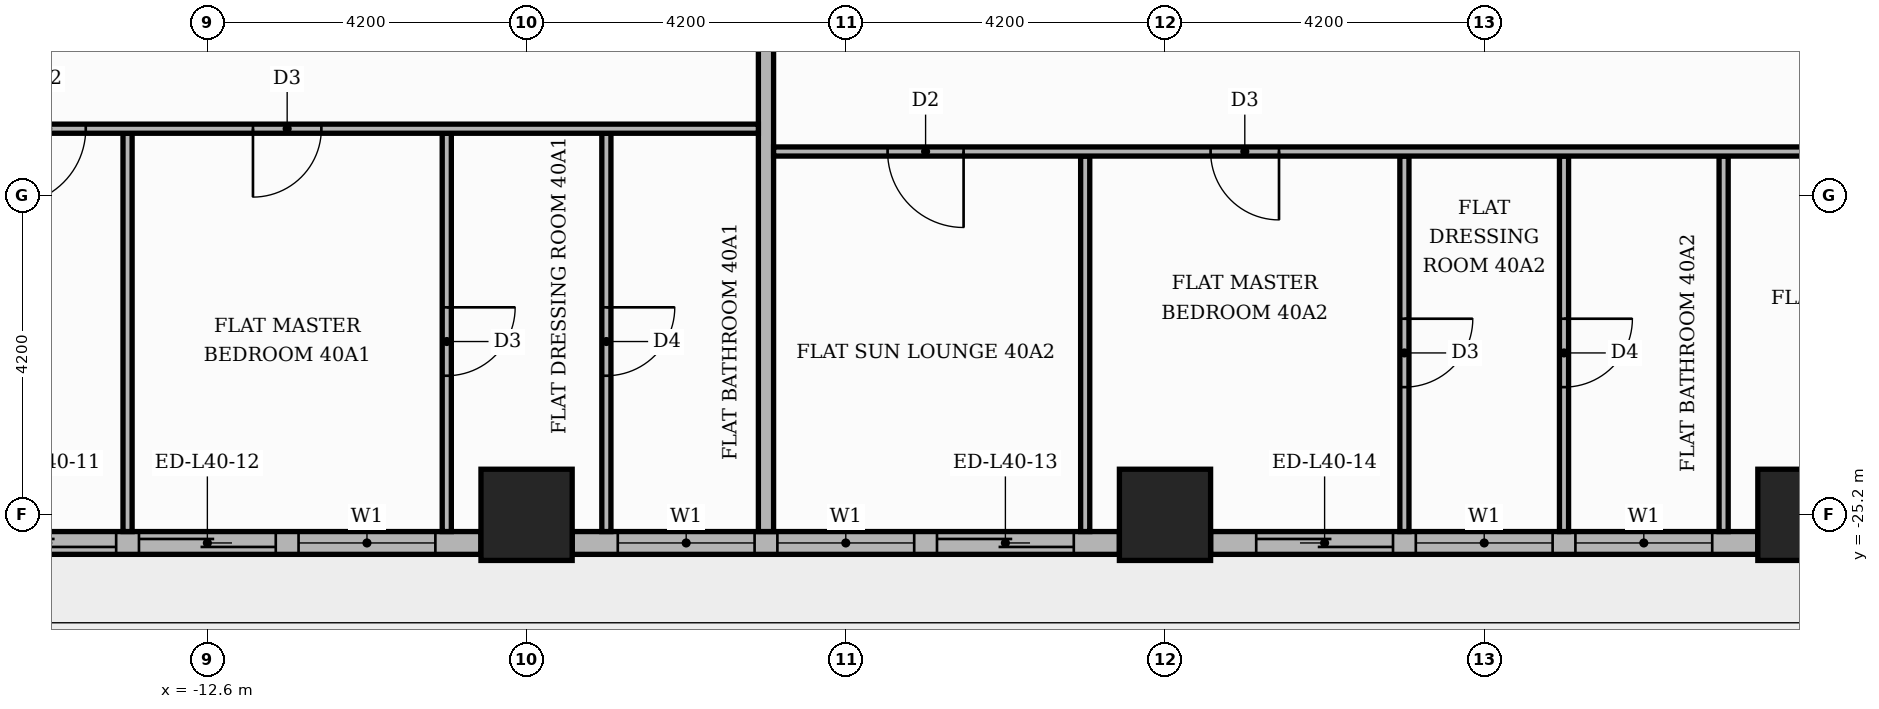
"""IFC4 building model, lengths in metres.
Left out: names, types, materials, properties, quantities, classifications, styles, units other than length and angle.
Written with IfcOpenShell. Run it as: python <this file> out.ifc"""

import sys

from ifc_helpers import new_model, si_unit, direction, frame, frame_2d, origin, origin_2d, place, context, subcontext, project, spatial, rectangle, extrude, element, fill, save


model = new_model("IFC4")
c1 = context("Model", 3, precision=1e-05, world=origin(), true_north=direction((0.0, 1.0)))
c2 = subcontext(c1, "Body", "Model", "MODEL_VIEW")
j1 = project(units=[si_unit("LENGTHUNIT", "METRE"), si_unit("PLANEANGLEUNIT", "RADIAN")], contexts=[c1])
p1 = place(None, origin())
s1 = spatial("IfcSite", under=j1, at=p1, CompositionType="ELEMENT")
p2 = place(p1, origin())
s2 = spatial("IfcBuilding", under=s1, at=p2, CompositionType="ELEMENT")
p3 = place(p2, frame((0.0, 0.0, 168.9)))
s3 = spatial("IfcBuildingStorey", under=s2, at=p3, CompositionType="ELEMENT", Elevation=168.9)
for number, where, z_axis, x_axis in (
    (1, (0.0, -25.2, 0.0), (0.0, 0.0, 1.0), (1.0, 0.0, 0.0)),
    (2, (8.4, -25.2, 0.0), (0.0, 0.0, 1.0), (1.0, 0.0, 0.0)),
    (3, (-8.4, -25.2, 0.0), (0.0, 0.0, 1.0), (1.0, 0.0, 0.0)),
):
    element("IfcColumn", number, at=place(p3, frame(where, z_axis=z_axis, x_axis=x_axis)), inside=s3, PredefinedType="COLUMN", context=c2, shape_type="SweptSolid", body=[
        extrude(rectangle(XDim=1.2, YDim=1.2, at=origin_2d()), origin(), (0.0, 0.0, 1.0), 3.9),
    ])
p4 = place(p3, frame((-16.2, -25.57, 0.0), z_axis=(0.0, 0.0, 1.0), x_axis=(1.0, 0.0, 0.0)))
e4 = element("IfcWall", 4, at=p4, inside=s3, PredefinedType="STANDARD", context=c2, shape_type="SweptSolid", body=[
    extrude(rectangle(XDim=7.2, YDim=0.3, at=frame_2d((3.6, 0.0))), origin(), (0.0, 0.0, 1.0), 3.48),
])
p5 = place(p4, frame((0.6, 0.0, 0.0)))
e5 = element("IfcOpeningElement", 5, at=p5, cuts=e4, PredefinedType="OPENING", context=c2, shape_type="SweptSolid", body=[
    extrude(rectangle(XDim=1.8, YDim=2.4, at=frame_2d((0.9, 1.2))), frame((0.0, 0.16, 0.0), z_axis=(0.0, -1.0, 0.0), x_axis=(1.0, 0.0, 0.0)), (0.0, 0.0, 1.0), 0.32),
])
p6 = place(p4, frame((2.7, 0.0, 0.0)))
e6 = element("IfcOpeningElement", 6, at=p6, cuts=e4, PredefinedType="OPENING", context=c2, shape_type="SweptSolid", body=[
    extrude(rectangle(XDim=1.8, YDim=2.4, at=frame_2d((0.9, 1.2))), frame((0.0, 0.16, 0.0), z_axis=(0.0, -1.0, 0.0), x_axis=(1.0, 0.0, 0.0)), (0.0, 0.0, 1.0), 0.32),
])
p7 = place(p4, frame((4.8, 0.0, 0.9)))
e7 = element("IfcOpeningElement", 7, at=p7, cuts=e4, PredefinedType="OPENING", context=c2, shape_type="SweptSolid", body=[
    extrude(rectangle(XDim=1.8, YDim=2.1, at=frame_2d((0.9, 1.05))), frame((0.0, 0.16, 0.0), z_axis=(0.0, -1.0, 0.0), x_axis=(1.0, 0.0, 0.0)), (0.0, 0.0, 1.0), 0.32),
])
p8 = place(p3, frame((-7.8, -25.57, 0.0), z_axis=(0.0, 0.0, 1.0), x_axis=(1.0, 0.0, 0.0)))
e8 = element("IfcWall", 8, at=p8, inside=s3, PredefinedType="STANDARD", context=c2, shape_type="SweptSolid", body=[
    extrude(rectangle(XDim=7.2, YDim=0.3, at=frame_2d((3.6, 0.0))), origin(), (0.0, 0.0, 1.0), 3.48),
])
p9 = place(p8, frame((0.6, 0.0, 0.9)))
e9 = element("IfcOpeningElement", 9, at=p9, cuts=e8, PredefinedType="OPENING", context=c2, shape_type="SweptSolid", body=[
    extrude(rectangle(XDim=1.8, YDim=2.1, at=frame_2d((0.9, 1.05))), frame((0.0, 0.16, 0.0), z_axis=(0.0, -1.0, 0.0), x_axis=(1.0, 0.0, 0.0)), (0.0, 0.0, 1.0), 0.32),
])
p10 = place(p8, frame((2.7, 0.0, 0.9)))
e10 = element("IfcOpeningElement", 10, at=p10, cuts=e8, PredefinedType="OPENING", context=c2, shape_type="SweptSolid", body=[
    extrude(rectangle(XDim=1.8, YDim=2.1, at=frame_2d((0.9, 1.05))), frame((0.0, 0.16, 0.0), z_axis=(0.0, -1.0, 0.0), x_axis=(1.0, 0.0, 0.0)), (0.0, 0.0, 1.0), 0.32),
])
p11 = place(p8, frame((4.8, 0.0, 0.0)))
e11 = element("IfcOpeningElement", 11, at=p11, cuts=e8, PredefinedType="OPENING", context=c2, shape_type="SweptSolid", body=[
    extrude(rectangle(XDim=1.8, YDim=2.4, at=frame_2d((0.9, 1.2))), frame((0.0, 0.16, 0.0), z_axis=(0.0, -1.0, 0.0), x_axis=(1.0, 0.0, 0.0)), (0.0, 0.0, 1.0), 0.32),
])
p12 = place(p3, frame((0.6, -25.57, 0.0), z_axis=(0.0, 0.0, 1.0), x_axis=(1.0, 0.0, 0.0)))
e12 = element("IfcWall", 12, at=p12, inside=s3, PredefinedType="STANDARD", context=c2, shape_type="SweptSolid", body=[
    extrude(rectangle(XDim=7.2, YDim=0.3, at=frame_2d((3.6, 0.0))), origin(), (0.0, 0.0, 1.0), 3.48),
])
p13 = place(p12, frame((0.6, 0.0, 0.0)))
e13 = element("IfcOpeningElement", 13, at=p13, cuts=e12, PredefinedType="OPENING", context=c2, shape_type="SweptSolid", body=[
    extrude(rectangle(XDim=1.8, YDim=2.4, at=frame_2d((0.9, 1.2))), frame((0.0, 0.16, 0.0), z_axis=(0.0, -1.0, 0.0), x_axis=(1.0, 0.0, 0.0)), (0.0, 0.0, 1.0), 0.32),
])
p14 = place(p12, frame((2.7, 0.0, 0.9)))
e14 = element("IfcOpeningElement", 14, at=p14, cuts=e12, PredefinedType="OPENING", context=c2, shape_type="SweptSolid", body=[
    extrude(rectangle(XDim=1.8, YDim=2.1, at=frame_2d((0.9, 1.05))), frame((0.0, 0.16, 0.0), z_axis=(0.0, -1.0, 0.0), x_axis=(1.0, 0.0, 0.0)), (0.0, 0.0, 1.0), 0.32),
])
p15 = place(p12, frame((4.8, 0.0, 0.9)))
e15 = element("IfcOpeningElement", 15, at=p15, cuts=e12, PredefinedType="OPENING", context=c2, shape_type="SweptSolid", body=[
    extrude(rectangle(XDim=1.8, YDim=2.1, at=frame_2d((0.9, 1.05))), frame((0.0, 0.16, 0.0), z_axis=(0.0, -1.0, 0.0), x_axis=(1.0, 0.0, 0.0)), (0.0, 0.0, 1.0), 0.32),
])
p16 = place(p3, frame((-13.65, -25.42, 0.0), z_axis=(0.0, 0.0, 1.0), x_axis=(0.0, 1.0, 0.0)))
e16 = element("IfcWall", 16, at=p16, inside=s3, PredefinedType="PARTITIONING", context=c2, shape_type="SweptSolid", body=[
    extrude(rectangle(XDim=5.24, YDim=0.12, at=frame_2d((2.62, 0.0))), origin(), (0.0, 0.0, 1.0), 3.48),
])
p17 = place(p3, frame((-9.45, -25.42, 0.0), z_axis=(0.0, 0.0, 1.0), x_axis=(0.0, 1.0, 0.0)))
e17 = element("IfcWall", 17, at=p17, inside=s3, PredefinedType="PARTITIONING", context=c2, shape_type="SweptSolid", body=[
    extrude(rectangle(XDim=5.24, YDim=0.12, at=frame_2d((2.62, 0.0))), origin(), (0.0, 0.0, 1.0), 3.48),
])
p18 = place(p17, frame((2.05, 0.0, 0.0)))
e18 = element("IfcOpeningElement", 18, at=p18, cuts=e17, PredefinedType="OPENING", context=c2, shape_type="SweptSolid", body=[
    extrude(rectangle(XDim=0.9, YDim=2.1, at=frame_2d((0.45, 1.05))), frame((0.0, 0.07, 0.0), z_axis=(0.0, -1.0, 0.0), x_axis=(1.0, 0.0, 0.0)), (0.0, 0.0, 1.0), 0.14),
])
p19 = place(p3, frame((-7.35, -25.42, 0.0), z_axis=(0.0, 0.0, 1.0), x_axis=(0.0, 1.0, 0.0)))
e19 = element("IfcWall", 19, at=p19, inside=s3, PredefinedType="PARTITIONING", context=c2, shape_type="SweptSolid", body=[
    extrude(rectangle(XDim=5.24, YDim=0.12, at=frame_2d((2.62, 0.0))), origin(), (0.0, 0.0, 1.0), 3.48),
])
p20 = place(p19, frame((2.05, 0.0, 0.0)))
e20 = element("IfcOpeningElement", 20, at=p20, cuts=e19, PredefinedType="OPENING", context=c2, shape_type="SweptSolid", body=[
    extrude(rectangle(XDim=0.9, YDim=2.1, at=frame_2d((0.45, 1.05))), frame((0.0, 0.07, 0.0), z_axis=(0.0, -1.0, 0.0), x_axis=(1.0, 0.0, 0.0)), (0.0, 0.0, 1.0), 0.14),
])
p21 = place(p3, frame((-5.25, -25.42, 0.0), z_axis=(0.0, 0.0, 1.0), x_axis=(0.0, 1.0, 0.0)))
e21 = element("IfcWall", 21, at=p21, inside=s3, PredefinedType="PARTITIONING", context=c2, shape_type="SweptSolid", body=[
    extrude(rectangle(XDim=11.67, YDim=0.2, at=frame_2d((5.835, 0.0))), origin(), (0.0, 0.0, 1.0), 3.48),
])
p22 = place(p3, frame((-1.05, -25.42, 0.0), z_axis=(0.0, 0.0, 1.0), x_axis=(0.0, 1.0, 0.0)))
e22 = element("IfcWall", 22, at=p22, inside=s3, PredefinedType="PARTITIONING", context=c2, shape_type="SweptSolid", body=[
    extrude(rectangle(XDim=4.94, YDim=0.12, at=frame_2d((2.47, 0.0))), origin(), (0.0, 0.0, 1.0), 3.48),
])
p23 = place(p3, frame((3.15, -25.42, 0.0), z_axis=(0.0, 0.0, 1.0), x_axis=(0.0, 1.0, 0.0)))
e23 = element("IfcWall", 23, at=p23, inside=s3, PredefinedType="PARTITIONING", context=c2, shape_type="SweptSolid", body=[
    extrude(rectangle(XDim=4.94, YDim=0.12, at=frame_2d((2.47, 0.0))), origin(), (0.0, 0.0, 1.0), 3.48),
])
p24 = place(p23, frame((1.9, 0.0, 0.0)))
e24 = element("IfcOpeningElement", 24, at=p24, cuts=e23, PredefinedType="OPENING", context=c2, shape_type="SweptSolid", body=[
    extrude(rectangle(XDim=0.9, YDim=2.1, at=frame_2d((0.45, 1.05))), frame((0.0, 0.07, 0.0), z_axis=(0.0, -1.0, 0.0), x_axis=(1.0, 0.0, 0.0)), (0.0, 0.0, 1.0), 0.14),
])
p25 = place(p3, frame((5.25, -25.42, 0.0), z_axis=(0.0, 0.0, 1.0), x_axis=(0.0, 1.0, 0.0)))
e25 = element("IfcWall", 25, at=p25, inside=s3, PredefinedType="PARTITIONING", context=c2, shape_type="SweptSolid", body=[
    extrude(rectangle(XDim=4.94, YDim=0.12, at=frame_2d((2.47, 0.0))), origin(), (0.0, 0.0, 1.0), 3.48),
])
p26 = place(p25, frame((1.9, 0.0, 0.0)))
e26 = element("IfcOpeningElement", 26, at=p26, cuts=e25, PredefinedType="OPENING", context=c2, shape_type="SweptSolid", body=[
    extrude(rectangle(XDim=0.9, YDim=2.1, at=frame_2d((0.45, 1.05))), frame((0.0, 0.07, 0.0), z_axis=(0.0, -1.0, 0.0), x_axis=(1.0, 0.0, 0.0)), (0.0, 0.0, 1.0), 0.14),
])
p27 = place(p3, frame((7.35, -25.42, 0.0), z_axis=(0.0, 0.0, 1.0), x_axis=(0.0, 1.0, 0.0)))
e27 = element("IfcWall", 27, at=p27, inside=s3, PredefinedType="PARTITIONING", context=c2, shape_type="SweptSolid", body=[
    extrude(rectangle(XDim=4.94, YDim=0.12, at=frame_2d((2.47, 0.0))), origin(), (0.0, 0.0, 1.0), 3.48),
])
p28 = place(p3, frame((-5.15, -20.42, 0.0), z_axis=(0.0, 0.0, 1.0), x_axis=(1.0, 0.0, 0.0)))
e28 = element("IfcWall", 28, at=p28, inside=s3, PredefinedType="PARTITIONING", context=c2, shape_type="SweptSolid", body=[
    extrude(rectangle(XDim=18.7, YDim=0.12, at=frame_2d((9.35, 0.0))), origin(), (0.0, 0.0, 1.0), 3.48),
])
p29 = place(p28, frame((1.5, 0.0, 0.0)))
e29 = element("IfcOpeningElement", 29, at=p29, cuts=e28, PredefinedType="OPENING", context=c2, shape_type="SweptSolid", body=[
    extrude(rectangle(XDim=1.0, YDim=2.1, at=frame_2d((0.5, 1.05))), frame((0.0, 0.07, 0.0), z_axis=(0.0, -1.0, 0.0), x_axis=(1.0, 0.0, 0.0)), (0.0, 0.0, 1.0), 0.14),
])
p30 = place(p28, frame((5.75, 0.0, 0.0)))
e30 = element("IfcOpeningElement", 30, at=p30, cuts=e28, PredefinedType="OPENING", context=c2, shape_type="SweptSolid", body=[
    extrude(rectangle(XDim=0.9, YDim=2.1, at=frame_2d((0.45, 1.05))), frame((0.0, 0.07, 0.0), z_axis=(0.0, -1.0, 0.0), x_axis=(1.0, 0.0, 0.0)), (0.0, 0.0, 1.0), 0.14),
])
p31 = place(p28, frame((14.15, 0.0, 0.0)))
e31 = element("IfcOpeningElement", 31, at=p31, cuts=e28, PredefinedType="OPENING", context=c2, shape_type="SweptSolid", body=[
    extrude(rectangle(XDim=0.9, YDim=2.1, at=frame_2d((0.45, 1.05))), frame((0.0, 0.07, 0.0), z_axis=(0.0, -1.0, 0.0), x_axis=(1.0, 0.0, 0.0)), (0.0, 0.0, 1.0), 0.14),
])
p32 = place(p3, frame((-25.42, -20.12, 0.0), z_axis=(0.0, 0.0, 1.0), x_axis=(1.0, 0.0, 0.0)))
e32 = element("IfcWall", 32, at=p32, inside=s3, PredefinedType="PARTITIONING", context=c2, shape_type="SweptSolid", body=[
    extrude(rectangle(XDim=20.07, YDim=0.12, at=frame_2d((10.035, 0.0))), origin(), (0.0, 0.0, 1.0), 3.48),
])
p33 = place(p32, frame((10.22, 0.0, 0.0)))
e33 = element("IfcOpeningElement", 33, at=p33, cuts=e32, PredefinedType="OPENING", context=c2, shape_type="SweptSolid", body=[
    extrude(rectangle(XDim=1.0, YDim=2.1, at=frame_2d((0.5, 1.05))), frame((0.0, 0.07, 0.0), z_axis=(0.0, -1.0, 0.0), x_axis=(1.0, 0.0, 0.0)), (0.0, 0.0, 1.0), 0.14),
])
p34 = place(p32, frame((13.42, 0.0, 0.0)))
e34 = element("IfcOpeningElement", 34, at=p34, cuts=e32, PredefinedType="OPENING", context=c2, shape_type="SweptSolid", body=[
    extrude(rectangle(XDim=0.9, YDim=2.1, at=frame_2d((0.45, 1.05))), frame((0.0, 0.07, 0.0), z_axis=(0.0, -1.0, 0.0), x_axis=(1.0, 0.0, 0.0)), (0.0, 0.0, 1.0), 0.14),
])
p35 = place(p5, origin())
e35 = element("IfcDoor", 35, at=p35, inside=s3, OperationType="SLIDING_TO_LEFT", PredefinedType="DOOR", context=c2, shape_type="SweptSolid", body=[
    extrude(rectangle(XDim=1.8, YDim=2.4, at=frame_2d((0.9, 1.2))), frame((0.0, 0.025, 0.0), z_axis=(0.0, -1.0, 0.0), x_axis=(1.0, 0.0, 0.0)), (0.0, 0.0, 1.0), 0.05),
])
fill(e5, e35)
p36 = place(p6, origin())
e36 = element("IfcDoor", 36, at=p36, inside=s3, OperationType="SLIDING_TO_RIGHT", PredefinedType="DOOR", context=c2, shape_type="SweptSolid", body=[
    extrude(rectangle(XDim=1.8, YDim=2.4, at=frame_2d((0.9, 1.2))), frame((0.0, 0.025, 0.0), z_axis=(0.0, -1.0, 0.0), x_axis=(1.0, 0.0, 0.0)), (0.0, 0.0, 1.0), 0.05),
])
fill(e6, e36)
p37 = place(p7, origin())
e37 = element("IfcWindow", 37, at=p37, inside=s3, PartitioningType="SINGLE_PANEL", PredefinedType="WINDOW", context=c2, shape_type="SweptSolid", body=[
    extrude(rectangle(XDim=1.8, YDim=2.1, at=frame_2d((0.9, 1.05))), frame((0.0, 0.03, 0.0), z_axis=(0.0, -1.0, 0.0), x_axis=(1.0, 0.0, 0.0)), (0.0, 0.0, 1.0), 0.06),
])
fill(e7, e37)
p38 = place(p9, origin())
e38 = element("IfcWindow", 38, at=p38, inside=s3, PartitioningType="SINGLE_PANEL", PredefinedType="WINDOW", context=c2, shape_type="SweptSolid", body=[
    extrude(rectangle(XDim=1.8, YDim=2.1, at=frame_2d((0.9, 1.05))), frame((0.0, 0.03, 0.0), z_axis=(0.0, -1.0, 0.0), x_axis=(1.0, 0.0, 0.0)), (0.0, 0.0, 1.0), 0.06),
])
fill(e9, e38)
p39 = place(p10, origin())
e39 = element("IfcWindow", 39, at=p39, inside=s3, PartitioningType="SINGLE_PANEL", PredefinedType="WINDOW", context=c2, shape_type="SweptSolid", body=[
    extrude(rectangle(XDim=1.8, YDim=2.1, at=frame_2d((0.9, 1.05))), frame((0.0, 0.03, 0.0), z_axis=(0.0, -1.0, 0.0), x_axis=(1.0, 0.0, 0.0)), (0.0, 0.0, 1.0), 0.06),
])
fill(e10, e39)
p40 = place(p11, origin())
e40 = element("IfcDoor", 40, at=p40, inside=s3, OperationType="SLIDING_TO_RIGHT", PredefinedType="DOOR", context=c2, shape_type="SweptSolid", body=[
    extrude(rectangle(XDim=1.8, YDim=2.4, at=frame_2d((0.9, 1.2))), frame((0.0, 0.025, 0.0), z_axis=(0.0, -1.0, 0.0), x_axis=(1.0, 0.0, 0.0)), (0.0, 0.0, 1.0), 0.05),
])
fill(e11, e40)
p41 = place(p13, origin())
e41 = element("IfcDoor", 41, at=p41, inside=s3, OperationType="SLIDING_TO_LEFT", PredefinedType="DOOR", context=c2, shape_type="SweptSolid", body=[
    extrude(rectangle(XDim=1.8, YDim=2.4, at=frame_2d((0.9, 1.2))), frame((0.0, 0.025, 0.0), z_axis=(0.0, -1.0, 0.0), x_axis=(1.0, 0.0, 0.0)), (0.0, 0.0, 1.0), 0.05),
])
fill(e13, e41)
p42 = place(p14, origin())
e42 = element("IfcWindow", 42, at=p42, inside=s3, PartitioningType="SINGLE_PANEL", PredefinedType="WINDOW", context=c2, shape_type="SweptSolid", body=[
    extrude(rectangle(XDim=1.8, YDim=2.1, at=frame_2d((0.9, 1.05))), frame((0.0, 0.03, 0.0), z_axis=(0.0, -1.0, 0.0), x_axis=(1.0, 0.0, 0.0)), (0.0, 0.0, 1.0), 0.06),
])
fill(e14, e42)
p43 = place(p15, origin())
e43 = element("IfcWindow", 43, at=p43, inside=s3, PartitioningType="SINGLE_PANEL", PredefinedType="WINDOW", context=c2, shape_type="SweptSolid", body=[
    extrude(rectangle(XDim=1.8, YDim=2.1, at=frame_2d((0.9, 1.05))), frame((0.0, 0.03, 0.0), z_axis=(0.0, -1.0, 0.0), x_axis=(1.0, 0.0, 0.0)), (0.0, 0.0, 1.0), 0.06),
])
fill(e15, e43)
p44 = place(p33, frame((1.0, 0.0, 0.0), z_axis=(0.0, 0.0, 1.0), x_axis=(-1.0, 0.0, 0.0)))
e44 = element("IfcDoor", 44, at=p44, inside=s3, OperationType="SINGLE_SWING_LEFT", PredefinedType="DOOR", context=c2, shape_type="SweptSolid", body=[
    extrude(rectangle(XDim=1.0, YDim=2.1, at=frame_2d((0.5, 1.05))), frame((0.0, 0.025, 0.0), z_axis=(0.0, -1.0, 0.0), x_axis=(1.0, 0.0, 0.0)), (0.0, 0.0, 1.0), 0.05),
])
fill(e33, e44)
p45 = place(p34, frame((0.9, 0.0, 0.0), z_axis=(0.0, 0.0, 1.0), x_axis=(-1.0, 0.0, 0.0)))
e45 = element("IfcDoor", 45, at=p45, inside=s3, OperationType="SINGLE_SWING_LEFT", PredefinedType="DOOR", context=c2, shape_type="SweptSolid", body=[
    extrude(rectangle(XDim=0.9, YDim=2.1, at=frame_2d((0.45, 1.05))), frame((0.0, 0.025, 0.0), z_axis=(0.0, -1.0, 0.0), x_axis=(1.0, 0.0, 0.0)), (0.0, 0.0, 1.0), 0.05),
])
fill(e34, e45)
p46 = place(p18, frame((0.9, 0.0, 0.0), z_axis=(0.0, 0.0, 1.0), x_axis=(-1.0, 0.0, 0.0)))
e46 = element("IfcDoor", 46, at=p46, inside=s3, OperationType="SINGLE_SWING_RIGHT", PredefinedType="DOOR", context=c2, shape_type="SweptSolid", body=[
    extrude(rectangle(XDim=0.9, YDim=2.1, at=frame_2d((0.45, 1.05))), frame((0.0, 0.025, 0.0), z_axis=(0.0, -1.0, 0.0), x_axis=(1.0, 0.0, 0.0)), (0.0, 0.0, 1.0), 0.05),
])
fill(e18, e46)
p47 = place(p20, frame((0.9, 0.0, 0.0), z_axis=(0.0, 0.0, 1.0), x_axis=(-1.0, 0.0, 0.0)))
e47 = element("IfcDoor", 47, at=p47, inside=s3, OperationType="SINGLE_SWING_RIGHT", PredefinedType="DOOR", context=c2, shape_type="SweptSolid", body=[
    extrude(rectangle(XDim=0.9, YDim=2.1, at=frame_2d((0.45, 1.05))), frame((0.0, 0.025, 0.0), z_axis=(0.0, -1.0, 0.0), x_axis=(1.0, 0.0, 0.0)), (0.0, 0.0, 1.0), 0.05),
])
fill(e20, e47)
p48 = place(p29, frame((1.0, 0.0, 0.0), z_axis=(0.0, 0.0, 1.0), x_axis=(-1.0, 0.0, 0.0)))
e48 = element("IfcDoor", 48, at=p48, inside=s3, OperationType="SINGLE_SWING_RIGHT", PredefinedType="DOOR", context=c2, shape_type="SweptSolid", body=[
    extrude(rectangle(XDim=1.0, YDim=2.1, at=frame_2d((0.5, 1.05))), frame((0.0, 0.025, 0.0), z_axis=(0.0, -1.0, 0.0), x_axis=(1.0, 0.0, 0.0)), (0.0, 0.0, 1.0), 0.05),
])
fill(e29, e48)
p49 = place(p30, frame((0.9, 0.0, 0.0), z_axis=(0.0, 0.0, 1.0), x_axis=(-1.0, 0.0, 0.0)))
e49 = element("IfcDoor", 49, at=p49, inside=s3, OperationType="SINGLE_SWING_RIGHT", PredefinedType="DOOR", context=c2, shape_type="SweptSolid", body=[
    extrude(rectangle(XDim=0.9, YDim=2.1, at=frame_2d((0.45, 1.05))), frame((0.0, 0.025, 0.0), z_axis=(0.0, -1.0, 0.0), x_axis=(1.0, 0.0, 0.0)), (0.0, 0.0, 1.0), 0.05),
])
fill(e30, e49)
p50 = place(p24, frame((0.9, 0.0, 0.0), z_axis=(0.0, 0.0, 1.0), x_axis=(-1.0, 0.0, 0.0)))
e50 = element("IfcDoor", 50, at=p50, inside=s3, OperationType="SINGLE_SWING_RIGHT", PredefinedType="DOOR", context=c2, shape_type="SweptSolid", body=[
    extrude(rectangle(XDim=0.9, YDim=2.1, at=frame_2d((0.45, 1.05))), frame((0.0, 0.025, 0.0), z_axis=(0.0, -1.0, 0.0), x_axis=(1.0, 0.0, 0.0)), (0.0, 0.0, 1.0), 0.05),
])
fill(e24, e50)
p51 = place(p26, frame((0.9, 0.0, 0.0), z_axis=(0.0, 0.0, 1.0), x_axis=(-1.0, 0.0, 0.0)))
e51 = element("IfcDoor", 51, at=p51, inside=s3, OperationType="SINGLE_SWING_RIGHT", PredefinedType="DOOR", context=c2, shape_type="SweptSolid", body=[
    extrude(rectangle(XDim=0.9, YDim=2.1, at=frame_2d((0.45, 1.05))), frame((0.0, 0.025, 0.0), z_axis=(0.0, -1.0, 0.0), x_axis=(1.0, 0.0, 0.0)), (0.0, 0.0, 1.0), 0.05),
])
fill(e26, e51)
save(model, sys.argv[1])
